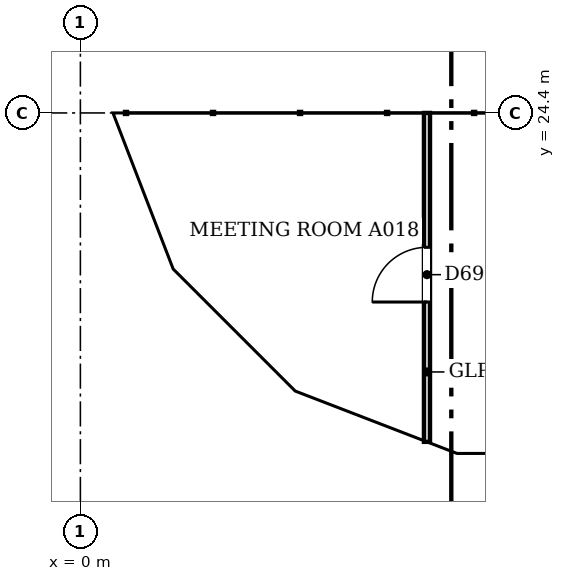
"""IFC4 building model, lengths in metres.
Left out: names, types, materials, properties, quantities, classifications, styles, units other than length and angle.
Written with IfcOpenShell. Run it as: python <this file> out.ifc"""

import sys

from ifc_helpers import new_model, si_unit, direction, frame, frame_2d, origin, place, context, subcontext, project, spatial, polyline, rectangle, outline, extrude, faceted_brep, source, transform, mapped, element, fill, save


model = new_model("IFC4")
c1 = context("Model", 3, precision=1e-05, world=origin(), true_north=direction((0.0, 1.0)))
c2 = subcontext(c1, "Body", "Model", "MODEL_VIEW")
j1 = project(units=[si_unit("LENGTHUNIT", "METRE"), si_unit("PLANEANGLEUNIT", "RADIAN")], contexts=[c1])
p1 = place(None, origin())
s1 = spatial("IfcSite", under=j1, at=p1, CompositionType="ELEMENT")
p2 = place(p1, origin())
s2 = spatial("IfcBuilding", under=s1, at=p2, CompositionType="ELEMENT")
p3 = place(p2, frame((0.0, 0.0, 56.2)))
s3 = spatial("IfcBuildingStorey", under=s2, at=p3, CompositionType="ELEMENT", Elevation=56.2)
m1 = source(origin(), c2, "Body", "Brep", [
    faceted_brep([(3.05, -0.25, 0.0), (6.053, -0.25, 3.8), (3.05, -0.25, 7.6), (0.0, -0.25, 3.8), (0.0, 0.25, 3.8), (3.05, 0.25, 7.6), (6.007, 0.25, 3.859), (6.007, 0.25, 3.741), (3.05, 0.25, 0.0), (6.053, 0.0, 3.8)], [[[0, 1, 2, 3]], [[4, 5, 6, 7, 8]], [[8, 7, 9, 1, 0]], [[6, 5, 2, 1, 9]], [[5, 4, 3, 2]], [[4, 8, 0, 3]], [[9, 7, 6]]]),
])
p4 = place(p3, frame((0.25, 30.5, -3.8), z_axis=(0.0, 0.0, 1.0), x_axis=(0.0, -1.0, 0.0)))
e1 = element("IfcWall", 1, at=p4, inside=s3, PredefinedType="SOLIDWALL", context=c2, shape_type="MappedRepresentation", body=[
    mapped(m1, transform((0.0, 0.0, 0.0), scale=1.0)),
])
m2 = source(origin(), c2, "Body", "SweptSolid", [
    extrude(outline(polyline([(3.049, 0.401), (5.735, 3.8), (3.049, 7.199), (0.321, 3.8), (3.049, 0.401)])), frame((0.0, 0.26, 0.0), z_axis=(0.0, -1.0, 0.0), x_axis=(1.0, 0.0, 0.0)), (0.0, 0.0, 1.0), 0.52),
])
p5 = place(p4, origin())
e2 = element("IfcOpeningElement", 2, at=p5, cuts=e1, PredefinedType="OPENING", context=c2, shape_type="MappedRepresentation", body=[
    mapped(m2, transform((0.0, 0.0, 0.0), scale=1.0)),
])
m3 = source(origin(), c2, "Body", "Brep", [
    faceted_brep([(2.95, -0.25, 0.0), (3.003, -0.25, 0.068), (3.003, -0.25, 7.532), (2.95, -0.25, 7.6), (0.0, -0.25, 3.8), (0.047, 0.25, 3.86), (2.898, 0.25, 7.532), (2.898, 0.25, 0.068), (0.047, 0.25, 3.74), (2.95, 0.0, 0.0), (2.95, 0.0, 7.6), (0.0, 0.0, 3.8)], [[[0, 1, 2, 3, 4]], [[5, 6, 7, 8]], [[1, 0, 9]], [[10, 3, 2]], [[6, 5, 11, 4, 3, 10]], [[8, 7, 9, 0, 4, 11]], [[8, 11, 5]], [[1, 9, 7, 6, 10, 2]]]),
])
p6 = place(p3, frame((0.25, 24.447, -3.8), z_axis=(0.0, 0.0, 1.0), x_axis=(0.35992665181, -0.932980602862, 0.0)))
e3 = element("IfcWall", 3, at=p6, inside=s3, PredefinedType="SOLIDWALL", context=c2, shape_type="MappedRepresentation", body=[
    mapped(m3, transform((0.0, 0.0, 0.0), scale=1.0)),
])
m4 = source(origin(), c2, "Body", "SweptSolid", [
    extrude(outline(polyline([(2.75, 6.935), (0.316, 3.8), (2.75, 0.665), (2.75, 6.935)])), frame((0.0, 0.26, 0.0), z_axis=(0.0, -1.0, 0.0), x_axis=(1.0, 0.0, 0.0)), (0.0, 0.0, 1.0), 0.52),
])
p7 = place(p6, origin())
e4 = element("IfcOpeningElement", 4, at=p7, cuts=e3, PredefinedType="OPENING", context=c2, shape_type="MappedRepresentation", body=[
    mapped(m4, transform((0.0, 0.0, 0.0), scale=1.0)),
])
m5 = source(origin(), c2, "Body", "Brep", [
    faceted_brep([(0.053, -0.25, 0.0), (2.997, -0.25, 3.8), (0.053, -0.25, 7.6), (0.0, -0.25, 7.532), (0.0, -0.25, 0.068), (0.106, 0.25, 7.532), (2.944, 0.25, 3.868), (2.944, 0.25, 3.732), (0.106, 0.25, 0.068), (2.997, 0.0, 3.8), (0.053, 0.0, 0.0), (0.053, 0.0, 7.6)], [[[0, 1, 2, 3, 4]], [[5, 6, 7, 8]], [[8, 7, 9, 1, 0, 10]], [[6, 5, 11, 2, 1, 9]], [[3, 2, 11]], [[10, 0, 4]], [[8, 10, 4, 3, 11, 5]], [[9, 7, 6]]]),
])
p8 = place(p3, frame((1.274, 21.731, -3.8), z_axis=(0.0, 0.0, 1.0), x_axis=(0.707147509625, -0.707066050402, 0.0)))
e5 = element("IfcWall", 5, at=p8, inside=s3, PredefinedType="SOLIDWALL", context=c2, shape_type="MappedRepresentation", body=[
    mapped(m5, transform((0.0, 0.0, 0.0), scale=1.0)),
])
m6 = source(origin(), c2, "Body", "SweptSolid", [
    extrude(outline(polyline([(0.253, 0.667), (2.681, 3.8), (0.253, 6.934), (0.253, 0.667)])), frame((0.0, 0.26, 0.0), z_axis=(0.0, -1.0, 0.0), x_axis=(1.0, 0.0, 0.0)), (0.0, 0.0, 1.0), 0.52),
])
p9 = place(p8, origin())
e6 = element("IfcOpeningElement", 6, at=p9, cuts=e5, PredefinedType="OPENING", context=c2, shape_type="MappedRepresentation", body=[
    mapped(m6, transform((0.0, 0.0, 0.0), scale=1.0)),
])
m7 = source(origin(), c2, "Body", "Brep", [
    faceted_brep([(2.95, -0.25, 0.0), (2.997, -0.25, 0.059), (2.997, -0.25, 7.541), (2.95, -0.25, 7.6), (0.0, -0.25, 3.8), (0.053, 0.25, 3.868), (2.904, 0.25, 7.54), (2.904, 0.25, 0.06), (0.053, 0.25, 3.732), (2.95, 0.0, 0.0), (2.95, 0.0, 7.6), (0.0, 0.0, 3.8)], [[[0, 1, 2, 3, 4]], [[5, 6, 7, 8]], [[1, 0, 9]], [[10, 3, 2]], [[6, 5, 11, 4, 3, 10]], [[8, 7, 9, 0, 4, 11]], [[8, 11, 5]], [[1, 9, 7, 6, 10, 2]]]),
])
p10 = place(p3, frame((3.394, 19.612, -3.8), z_axis=(0.0, 0.0, 1.0), x_axis=(0.932990326376, -0.359901446078, 0.0)))
e7 = element("IfcWall", 7, at=p10, inside=s3, PredefinedType="SOLIDWALL", context=c2, shape_type="MappedRepresentation", body=[
    mapped(m7, transform((0.0, 0.0, 0.0), scale=1.0)),
])
p11 = place(p10, origin())
e8 = element("IfcOpeningElement", 8, at=p11, cuts=e7, PredefinedType="OPENING", context=c2, shape_type="MappedRepresentation", body=[
    mapped(m4, transform((0.0, 0.0, 0.0), scale=1.0)),
])
m8 = source(origin(), c2, "Body", "Brep", [
    faceted_brep([(0.047, -0.25, 0.0), (3.05, -0.25, 3.8), (0.047, -0.25, 7.6), (0.0, -0.25, 7.54), (0.0, -0.25, 0.06), (0.093, 0.25, 7.541), (3.05, 0.25, 3.8), (0.093, 0.25, 0.059), (0.047, 0.0, 0.0), (0.047, 0.0, 7.6)], [[[0, 1, 2, 3, 4]], [[5, 6, 7]], [[7, 6, 1, 0, 8]], [[6, 5, 9, 2, 1]], [[3, 2, 9]], [[8, 0, 4]], [[7, 8, 4, 3, 9, 5]]]),
])
p12 = place(p3, frame((6.1, 18.55, -3.8), z_axis=(0.0, 0.0, 1.0), x_axis=(1.0, 0.0, 0.0)))
e9 = element("IfcWall", 9, at=p12, inside=s3, PredefinedType="SOLIDWALL", context=c2, shape_type="MappedRepresentation", body=[
    mapped(m8, transform((0.0, 0.0, 0.0), scale=1.0)),
])
m9 = source(origin(), c2, "Body", "SweptSolid", [
    extrude(outline(polyline([(0.247, 0.656), (2.731, 3.8), (0.247, 6.944), (0.247, 0.656)])), frame((0.0, 0.26, 0.0), z_axis=(0.0, -1.0, 0.0), x_axis=(1.0, 0.0, 0.0)), (0.0, 0.0, 1.0), 0.52),
])
p13 = place(p12, origin())
e10 = element("IfcOpeningElement", 10, at=p13, cuts=e9, PredefinedType="OPENING", context=c2, shape_type="MappedRepresentation", body=[
    mapped(m9, transform((0.0, 0.0, 0.0), scale=1.0)),
])
p14 = place(p2, frame((0.0, 0.0, 60.0)))
s4 = spatial("IfcBuildingStorey", under=s2, at=p14, CompositionType="ELEMENT", Elevation=60.0)
m10 = source(origin(), c2, "Body", "Brep", [
    faceted_brep([(3.003, -0.25, 0.0), (3.05, -0.25, 0.06), (3.05, -0.25, 7.54), (3.003, -0.25, 7.6), (0.0, -0.25, 3.8), (0.0, 0.25, 3.8), (2.957, 0.25, 7.541), (2.957, 0.25, 0.059), (3.003, 0.0, 0.0), (3.003, 0.0, 7.6)], [[[0, 1, 2, 3, 4]], [[5, 6, 7]], [[1, 0, 8]], [[9, 3, 2]], [[6, 5, 4, 3, 9]], [[5, 7, 8, 0, 4]], [[1, 8, 7, 6, 9, 2]]]),
])
p15 = place(p14, frame((0.25, 27.45, -3.8), z_axis=(0.0, 0.0, 1.0), x_axis=(0.0, -1.0, 0.0)))
e11 = element("IfcWall", 11, at=p15, inside=s4, PredefinedType="SOLIDWALL", context=c2, shape_type="MappedRepresentation", body=[
    mapped(m10, transform((0.0, 0.0, 0.0), scale=1.0)),
])
m11 = source(origin(), c2, "Body", "SweptSolid", [
    extrude(outline(polyline([(2.803, 6.944), (0.319, 3.8), (2.803, 0.656), (2.803, 6.944)])), frame((0.0, 0.26, 0.0), z_axis=(0.0, -1.0, 0.0), x_axis=(1.0, 0.0, 0.0)), (0.0, 0.0, 1.0), 0.52),
])
p16 = place(p15, origin())
e12 = element("IfcOpeningElement", 12, at=p16, cuts=e11, PredefinedType="OPENING", context=c2, shape_type="MappedRepresentation", body=[
    mapped(m11, transform((0.0, 0.0, 0.0), scale=1.0)),
])
m12 = source(origin(), c2, "Body", "Brep", [
    faceted_brep([(0.047, -0.25, 0.0), (2.997, -0.25, 3.8), (0.047, -0.25, 7.6), (0.0, -0.25, 7.541), (0.0, -0.25, 0.059), (0.093, 0.25, 7.54), (2.944, 0.25, 3.868), (2.944, 0.25, 3.732), (0.093, 0.25, 0.06), (2.997, 0.0, 3.8), (0.047, 0.0, 0.0), (0.047, 0.0, 7.6)], [[[0, 1, 2, 3, 4]], [[5, 6, 7, 8]], [[8, 7, 9, 1, 0, 10]], [[6, 5, 11, 2, 1, 9]], [[3, 2, 11]], [[10, 0, 4]], [[8, 10, 4, 3, 11, 5]], [[9, 7, 6]]]),
])
p17 = place(p14, frame((0.233, 24.49, -3.8), z_axis=(0.0, 0.0, 1.0), x_axis=(0.359901446078, -0.932990326376, 0.0)))
e13 = element("IfcWall", 13, at=p17, inside=s4, PredefinedType="SOLIDWALL", context=c2, shape_type="MappedRepresentation", body=[
    mapped(m12, transform((0.0, 0.0, 0.0), scale=1.0)),
])
m13 = source(origin(), c2, "Body", "SweptSolid", [
    extrude(outline(polyline([(0.247, 0.665), (2.681, 3.8), (0.247, 6.935), (0.247, 0.665)])), frame((0.0, 0.26, 0.0), z_axis=(0.0, -1.0, 0.0), x_axis=(1.0, 0.0, 0.0)), (0.0, 0.0, 1.0), 0.52),
])
p18 = place(p17, origin())
e14 = element("IfcOpeningElement", 14, at=p18, cuts=e13, PredefinedType="OPENING", context=c2, shape_type="MappedRepresentation", body=[
    mapped(m13, transform((0.0, 0.0, 0.0), scale=1.0)),
])
m14 = source(origin(), c2, "Body", "Brep", [
    faceted_brep([(2.944, -0.25, 0.0), (2.997, -0.25, 0.068), (2.997, -0.25, 7.532), (2.944, -0.25, 7.6), (0.0, -0.25, 3.8), (0.053, 0.25, 3.868), (2.891, 0.25, 7.532), (2.891, 0.25, 0.068), (0.053, 0.25, 3.732), (2.944, 0.0, 0.0), (2.944, 0.0, 7.6), (0.0, 0.0, 3.8)], [[[0, 1, 2, 3, 4]], [[5, 6, 7, 8]], [[1, 0, 9]], [[10, 3, 2]], [[6, 5, 11, 4, 3, 10]], [[8, 7, 9, 0, 4, 11]], [[8, 11, 5]], [[1, 9, 7, 6, 10, 2]]]),
])
p19 = place(p14, frame((1.312, 21.694, -3.8), z_axis=(0.0, 0.0, 1.0), x_axis=(0.707066050402, -0.707147509625, 0.0)))
e15 = element("IfcWall", 15, at=p19, inside=s4, PredefinedType="SOLIDWALL", context=c2, shape_type="MappedRepresentation", body=[
    mapped(m14, transform((0.0, 0.0, 0.0), scale=1.0)),
])
m15 = source(origin(), c2, "Body", "SweptSolid", [
    extrude(outline(polyline([(2.744, 6.934), (0.316, 3.8), (2.744, 0.666), (2.744, 6.934)])), frame((0.0, 0.26, 0.0), z_axis=(0.0, -1.0, 0.0), x_axis=(1.0, 0.0, 0.0)), (0.0, 0.0, 1.0), 0.52),
])
p20 = place(p19, origin())
e16 = element("IfcOpeningElement", 16, at=p20, cuts=e15, PredefinedType="OPENING", context=c2, shape_type="MappedRepresentation", body=[
    mapped(m15, transform((0.0, 0.0, 0.0), scale=1.0)),
])
m16 = source(origin(), c2, "Body", "Brep", [
    faceted_brep([(0.053, -0.25, 0.0), (3.003, -0.25, 3.8), (0.053, -0.25, 7.6), (0.0, -0.25, 7.532), (0.0, -0.25, 0.068), (0.106, 0.25, 7.532), (2.957, 0.25, 3.86), (2.957, 0.25, 3.74), (0.106, 0.25, 0.068), (3.003, 0.0, 3.8), (0.053, 0.0, 0.0), (0.053, 0.0, 7.6)], [[[0, 1, 2, 3, 4]], [[5, 6, 7, 8]], [[8, 7, 9, 1, 0, 10]], [[6, 5, 11, 2, 1, 9]], [[3, 2, 11]], [[10, 0, 4]], [[8, 10, 4, 3, 11, 5]], [[9, 7, 6]]]),
])
p21 = place(p14, frame((3.344, 19.631, -3.8), z_axis=(0.0, 0.0, 1.0), x_axis=(0.933007896601, -0.359855894603, 0.0)))
e17 = element("IfcWall", 17, at=p21, inside=s4, PredefinedType="SOLIDWALL", context=c2, shape_type="MappedRepresentation", body=[
    mapped(m16, transform((0.0, 0.0, 0.0), scale=1.0)),
])
m17 = source(origin(), c2, "Body", "SweptSolid", [
    extrude(outline(polyline([(0.253, 0.665), (2.687, 3.8), (0.253, 6.935), (0.253, 0.665)])), frame((0.0, 0.26, 0.0), z_axis=(0.0, -1.0, 0.0), x_axis=(1.0, 0.0, 0.0)), (0.0, 0.0, 1.0), 0.52),
])
p22 = place(p21, origin())
e18 = element("IfcOpeningElement", 18, at=p22, cuts=e17, PredefinedType="OPENING", context=c2, shape_type="MappedRepresentation", body=[
    mapped(m17, transform((0.0, 0.0, 0.0), scale=1.0)),
])
m18 = source(origin(), c2, "Body", "Brep", [
    faceted_brep([(3.003, -0.25, 0.0), (6.053, -0.25, 3.8), (3.003, -0.25, 7.6), (0.0, -0.25, 3.8), (0.047, 0.25, 3.859), (3.003, 0.25, 7.6), (6.053, 0.25, 3.8), (3.003, 0.25, 0.0), (0.047, 0.25, 3.741), (0.0, 0.0, 3.8)], [[[0, 1, 2, 3]], [[4, 5, 6, 7, 8]], [[7, 6, 1, 0]], [[6, 5, 2, 1]], [[5, 4, 9, 3, 2]], [[8, 7, 0, 3, 9]], [[8, 9, 4]]]),
])
p23 = place(p14, frame((6.146, 18.55, -3.8), z_axis=(0.0, 0.0, 1.0), x_axis=(1.0, 0.0, 0.0)))
e19 = element("IfcWall", 19, at=p23, inside=s4, PredefinedType="SOLIDWALL", context=c2, shape_type="MappedRepresentation", body=[
    mapped(m18, transform((0.0, 0.0, 0.0), scale=1.0)),
])
m19 = source(origin(), c2, "Body", "SweptSolid", [
    extrude(outline(polyline([(3.005, 0.401), (5.733, 3.8), (3.005, 7.199), (0.319, 3.8), (3.005, 0.401)])), frame((0.0, 0.26, 0.0), z_axis=(0.0, -1.0, 0.0), x_axis=(1.0, 0.0, 0.0)), (0.0, 0.0, 1.0), 0.52),
])
p24 = place(p23, origin())
e20 = element("IfcOpeningElement", 20, at=p24, cuts=e19, PredefinedType="OPENING", context=c2, shape_type="MappedRepresentation", body=[
    mapped(m19, transform((0.0, 0.0, 0.0), scale=1.0)),
])
p25 = place(p3, frame((5.7, 18.99, 0.0), z_axis=(0.0, 0.0, 1.0), x_axis=(0.0, 1.0, 0.0)))
e21 = element("IfcWall", 21, at=p25, inside=s3, PredefinedType="PARTITIONING", context=c2, shape_type="SweptSolid", body=[
    extrude(rectangle(XDim=5.41, YDim=0.1, at=frame_2d((2.705, 0.0))), origin(), (0.0, 0.0, 1.0), 3.067),
])
m20 = source(origin(), c2, "Body", "SweptSolid", [
    extrude(rectangle(XDim=0.9, YDim=2.1, at=frame_2d((0.45, 1.05))), frame((0.0, 0.06, 0.0), z_axis=(0.0, -1.0, 0.0), x_axis=(1.0, 0.0, 0.0)), (0.0, 0.0, 1.0), 0.12),
])
p26 = place(p25, frame((2.3, 0.0, 0.0)))
e22 = element("IfcOpeningElement", 22, at=p26, cuts=e21, PredefinedType="OPENING", context=c2, shape_type="MappedRepresentation", body=[
    mapped(m20, transform((0.0, 0.0, 0.0), scale=1.0)),
])
m21 = source(origin(), c2, "Body", "SweptSolid", [
    extrude(rectangle(XDim=0.9, YDim=2.1, at=frame_2d((0.45, 1.05))), frame((0.0, 0.025, 0.0), z_axis=(0.0, -1.0, 0.0), x_axis=(1.0, 0.0, 0.0)), (0.0, 0.0, 1.0), 0.05),
])
p27 = place(p26, origin())
e23 = element("IfcDoor", 23, at=p27, inside=s3, OperationType="SINGLE_SWING_LEFT", PredefinedType="DOOR", context=c2, shape_type="MappedRepresentation", body=[
    mapped(m21, transform((0.0, 0.0, 0.0), scale=1.0)),
])
fill(e22, e23)
save(model, sys.argv[1])
